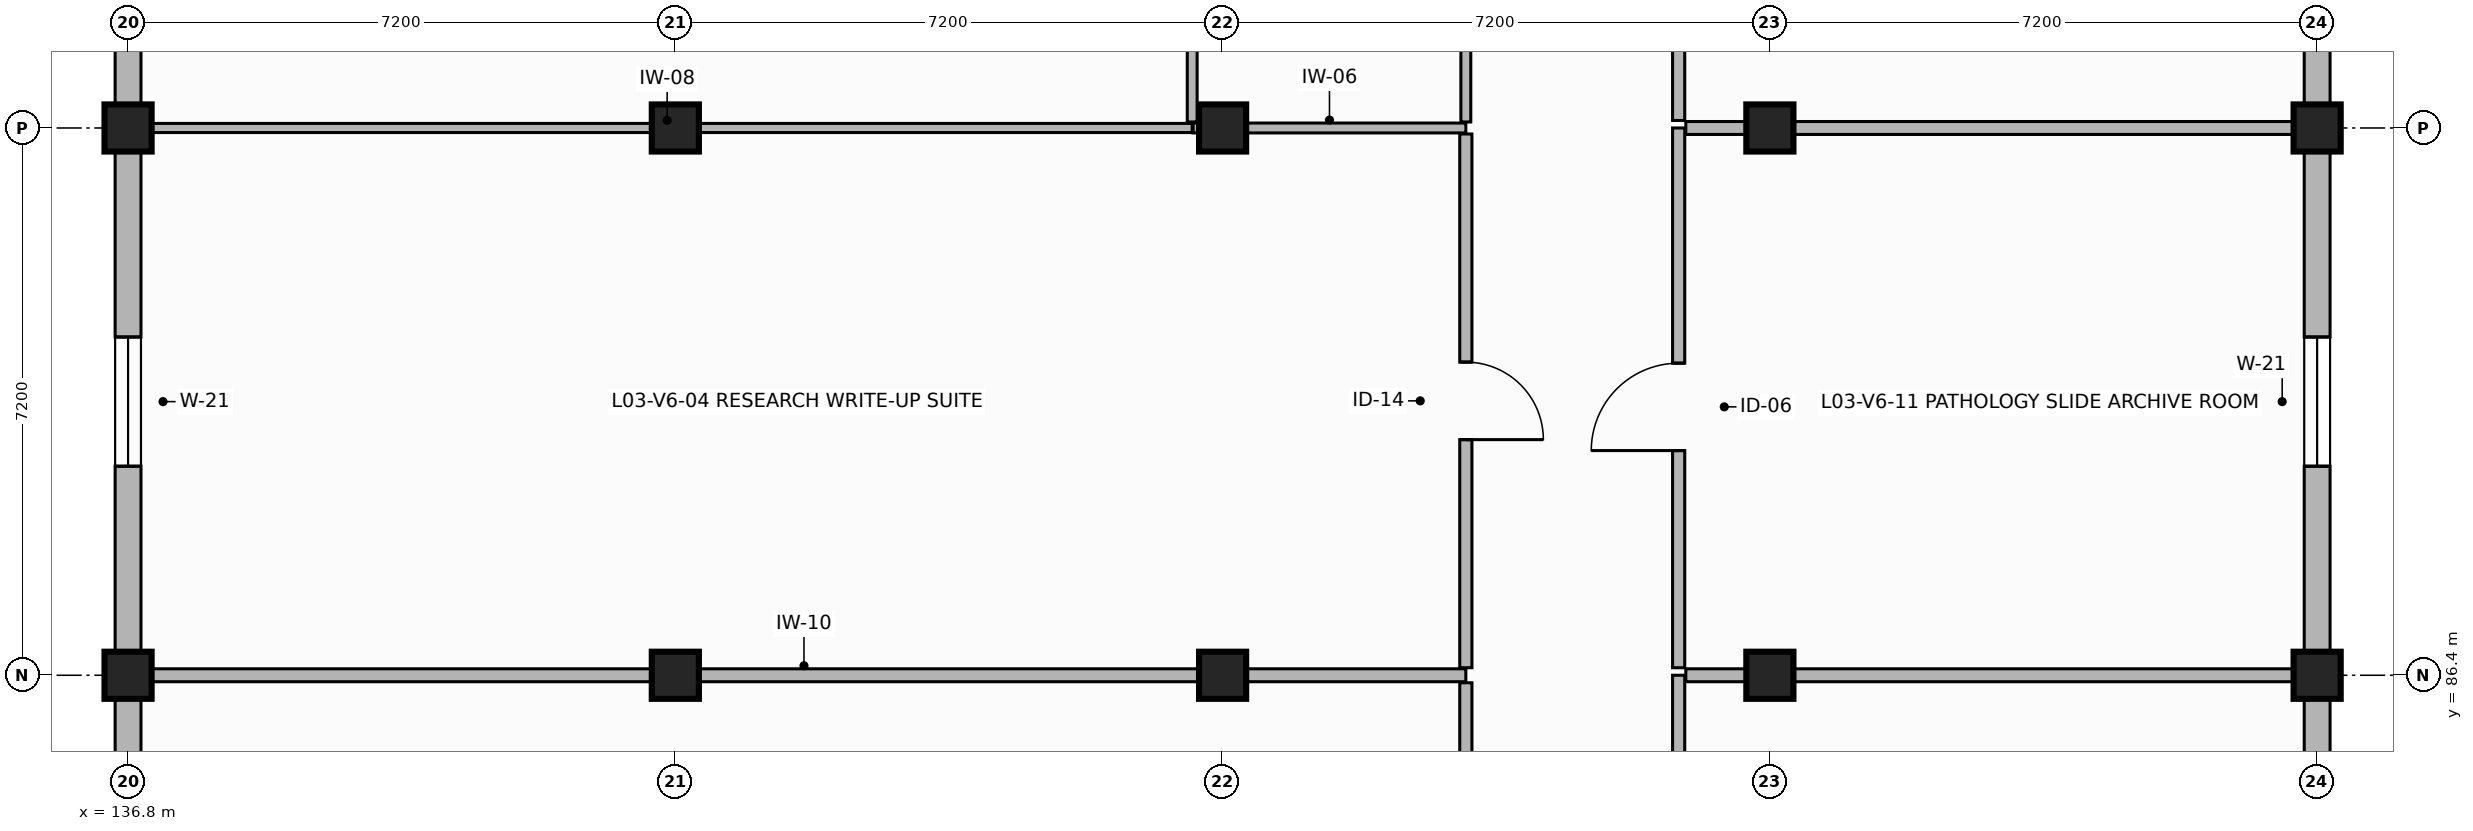
"""IFC4 building model, lengths in metres.
Left out: names, types, materials, properties, quantities, classifications, styles, units other than length and angle.
Written with IfcOpenShell. Run it as: python <this file> out.ifc"""

import sys

from ifc_helpers import new_model, si_unit, direction, frame, frame_2d, origin, origin_2d, place, context, subcontext, project, spatial, rectangle, extrude, element, fill, save


model = new_model("IFC4")
c1 = context("Model", 3, precision=1e-05, world=origin(), true_north=direction((0.0, 1.0)))
c2 = subcontext(c1, "Body", "Model", "MODEL_VIEW")
j1 = project(units=[si_unit("LENGTHUNIT", "METRE"), si_unit("PLANEANGLEUNIT", "RADIAN")], contexts=[c1])
p1 = place(None, origin())
s1 = spatial("IfcSite", under=j1, at=p1, CompositionType="ELEMENT")
p2 = place(p1, origin())
s2 = spatial("IfcBuilding", under=s1, at=p2, CompositionType="ELEMENT")
p3 = place(p2, frame((0.0, 0.0, 12.3)))
s3 = spatial("IfcBuildingStorey", under=s2, at=p3, CompositionType="ELEMENT", Elevation=12.3)
for number, where, z_axis, x_axis in (
    (1, (136.8, 86.4, 0.0), (0.0, 0.0, 1.0), (1.0, 0.0, 0.0)),
    (2, (136.8, 93.6, 0.0), (0.0, 0.0, 1.0), (1.0, 0.0, 0.0)),
    (3, (144.0, 86.4, 0.0), (0.0, 0.0, 1.0), (1.0, 0.0, 0.0)),
    (4, (144.0, 93.6, 0.0), (0.0, 0.0, 1.0), (1.0, 0.0, 0.0)),
    (5, (151.2, 86.4, 0.0), (0.0, 0.0, 1.0), (1.0, 0.0, 0.0)),
    (6, (151.2, 93.6, 0.0), (0.0, 0.0, 1.0), (1.0, 0.0, 0.0)),
    (7, (158.4, 86.4, 0.0), (0.0, 0.0, 1.0), (1.0, 0.0, 0.0)),
    (8, (158.4, 93.6, 0.0), (0.0, 0.0, 1.0), (1.0, 0.0, 0.0)),
    (9, (165.6, 86.4, 0.0), (0.0, 0.0, 1.0), (1.0, 0.0, 0.0)),
    (10, (165.6, 93.6, 0.0), (0.0, 0.0, 1.0), (1.0, 0.0, 0.0)),
):
    element("IfcColumn", number, at=place(p3, frame(where, z_axis=z_axis, x_axis=x_axis)), inside=s3, PredefinedType="COLUMN", context=c2, shape_type="SweptSolid", body=[
        extrude(rectangle(XDim=0.62, YDim=0.62, at=origin_2d()), origin(), (0.0, 0.0, 1.0), 3.38),
    ])
p4 = place(p3, frame((165.6, 79.2, 0.0), z_axis=(0.0, 0.0, 1.0), x_axis=(0.0, 1.0, 0.0)))
e11 = element("IfcWall", 11, at=p4, inside=s3, PredefinedType="SOLIDWALL", context=c2, shape_type="SweptSolid", body=[
    extrude(rectangle(XDim=7.2, YDim=0.34, at=frame_2d((3.6, 0.0))), origin(), (0.0, 0.0, 1.0), 2.71),
])
p5 = place(p4, frame((2.75, 0.0, 0.85)))
e12 = element("IfcOpeningElement", 12, at=p5, cuts=e11, PredefinedType="OPENING", context=c2, shape_type="SweptSolid", body=[
    extrude(rectangle(XDim=1.7, YDim=1.65, at=frame_2d((0.85, 0.825))), frame((0.0, 0.18, 0.0), z_axis=(0.0, -1.0, 0.0), x_axis=(1.0, 0.0, 0.0)), (0.0, 0.0, 1.0), 0.36),
])
p6 = place(p3, frame((165.6, 86.4, 0.0), z_axis=(0.0, 0.0, 1.0), x_axis=(0.0, 1.0, 0.0)))
e13 = element("IfcWall", 13, at=p6, inside=s3, PredefinedType="SOLIDWALL", context=c2, shape_type="SweptSolid", body=[
    extrude(rectangle(XDim=7.2, YDim=0.34, at=frame_2d((3.6, 0.0))), origin(), (0.0, 0.0, 1.0), 2.71),
])
p7 = place(p6, frame((2.75, 0.0, 0.85)))
e14 = element("IfcOpeningElement", 14, at=p7, cuts=e13, PredefinedType="OPENING", context=c2, shape_type="SweptSolid", body=[
    extrude(rectangle(XDim=1.7, YDim=1.65, at=frame_2d((0.85, 0.825))), frame((0.0, 0.18, 0.0), z_axis=(0.0, -1.0, 0.0), x_axis=(1.0, 0.0, 0.0)), (0.0, 0.0, 1.0), 0.36),
])
p8 = place(p3, frame((165.6, 93.6, 0.0), z_axis=(0.0, 0.0, 1.0), x_axis=(0.0, 1.0, 0.0)))
e15 = element("IfcWall", 15, at=p8, inside=s3, PredefinedType="SOLIDWALL", context=c2, shape_type="SweptSolid", body=[
    extrude(rectangle(XDim=7.2, YDim=0.34, at=frame_2d((3.6, 0.0))), origin(), (0.0, 0.0, 1.0), 2.71),
])
p9 = place(p8, frame((2.75, 0.0, 0.85)))
e16 = element("IfcOpeningElement", 16, at=p9, cuts=e15, PredefinedType="OPENING", context=c2, shape_type="SweptSolid", body=[
    extrude(rectangle(XDim=1.7, YDim=1.65, at=frame_2d((0.85, 0.825))), frame((0.0, 0.18, 0.0), z_axis=(0.0, -1.0, 0.0), x_axis=(1.0, 0.0, 0.0)), (0.0, 0.0, 1.0), 0.36),
])
p10 = place(p3, frame((136.8, 100.8, 0.0), z_axis=(0.0, 0.0, 1.0), x_axis=(0.0, -1.0, 0.0)))
e17 = element("IfcWall", 17, at=p10, inside=s3, PredefinedType="SOLIDWALL", context=c2, shape_type="SweptSolid", body=[
    extrude(rectangle(XDim=7.2, YDim=0.34, at=frame_2d((3.6, 0.0))), origin(), (0.0, 0.0, 1.0), 2.71),
])
p11 = place(p10, frame((2.75, 0.0, 0.85)))
e18 = element("IfcOpeningElement", 18, at=p11, cuts=e17, PredefinedType="OPENING", context=c2, shape_type="SweptSolid", body=[
    extrude(rectangle(XDim=1.7, YDim=1.65, at=frame_2d((0.85, 0.825))), frame((0.0, 0.18, 0.0), z_axis=(0.0, -1.0, 0.0), x_axis=(1.0, 0.0, 0.0)), (0.0, 0.0, 1.0), 0.36),
])
p12 = place(p3, frame((136.8, 93.6, 0.0), z_axis=(0.0, 0.0, 1.0), x_axis=(0.0, -1.0, 0.0)))
e19 = element("IfcWall", 19, at=p12, inside=s3, PredefinedType="SOLIDWALL", context=c2, shape_type="SweptSolid", body=[
    extrude(rectangle(XDim=7.2, YDim=0.34, at=frame_2d((3.6, 0.0))), origin(), (0.0, 0.0, 1.0), 2.71),
])
p13 = place(p12, frame((2.75, 0.0, 0.85)))
e20 = element("IfcOpeningElement", 20, at=p13, cuts=e19, PredefinedType="OPENING", context=c2, shape_type="SweptSolid", body=[
    extrude(rectangle(XDim=1.7, YDim=1.65, at=frame_2d((0.85, 0.825))), frame((0.0, 0.18, 0.0), z_axis=(0.0, -1.0, 0.0), x_axis=(1.0, 0.0, 0.0)), (0.0, 0.0, 1.0), 0.36),
])
p14 = place(p3, frame((136.8, 86.4, 0.0), z_axis=(0.0, 0.0, 1.0), x_axis=(0.0, -1.0, 0.0)))
e21 = element("IfcWall", 21, at=p14, inside=s3, PredefinedType="SOLIDWALL", context=c2, shape_type="SweptSolid", body=[
    extrude(rectangle(XDim=7.2, YDim=0.34, at=frame_2d((3.6, 0.0))), origin(), (0.0, 0.0, 1.0), 2.71),
])
p15 = place(p14, frame((2.75, 0.0, 0.85)))
e22 = element("IfcOpeningElement", 22, at=p15, cuts=e21, PredefinedType="OPENING", context=c2, shape_type="SweptSolid", body=[
    extrude(rectangle(XDim=1.7, YDim=1.65, at=frame_2d((0.85, 0.825))), frame((0.0, 0.18, 0.0), z_axis=(0.0, -1.0, 0.0), x_axis=(1.0, 0.0, 0.0)), (0.0, 0.0, 1.0), 0.36),
])
p16 = place(p3, frame((136.985, 86.4, 0.0), z_axis=(0.0, 0.0, 1.0), x_axis=(1.0, 0.0, 0.0)))
e23 = element("IfcWall", 23, at=p16, inside=s3, PredefinedType="PARTITIONING", context=c2, shape_type="SweptSolid", body=[
    extrude(rectangle(XDim=17.415, YDim=0.17, at=frame_2d((8.708, 0.0))), origin(), (0.0, 0.0, 1.0), 2.69),
])
p17 = place(p3, frame((154.4, 86.301, 0.0), z_axis=(0.0, 0.0, 1.0), x_axis=(0.0, -1.0, 0.0)))
e24 = element("IfcWall", 24, at=p17, inside=s3, PredefinedType="PARTITIONING", context=c2, shape_type="SweptSolid", body=[
    extrude(rectangle(XDim=7.556, YDim=0.16, at=frame_2d((3.778, 0.0))), origin(), (0.0, 0.0, 1.0), 2.69),
])
p18 = place(p17, frame((2.848, 0.0, 0.0)))
e25 = element("IfcOpeningElement", 25, at=p18, cuts=e24, PredefinedType="OPENING", context=c2, shape_type="SweptSolid", body=[
    extrude(rectangle(XDim=1.15, YDim=2.25, at=frame_2d((0.575, 1.125))), frame((0.0, 0.09, 0.0), z_axis=(0.0, -1.0, 0.0), x_axis=(1.0, 0.0, 0.0)), (0.0, 0.0, 1.0), 0.18),
])
p19 = place(p3, frame((136.985, 93.6, 0.0), z_axis=(0.0, 0.0, 1.0), x_axis=(1.0, 0.0, 0.0)))
e26 = element("IfcWall", 26, at=p19, inside=s3, PredefinedType="PARTITIONING", context=c2, shape_type="SweptSolid", body=[
    extrude(rectangle(XDim=13.815, YDim=0.12, at=frame_2d((6.907, 0.0))), origin(), (0.0, 0.0, 1.0), 2.69),
])
p20 = place(p3, frame((150.812, 93.6, 0.0), z_axis=(0.0, 0.0, 1.0), x_axis=(1.0, 0.0, 0.0)))
e27 = element("IfcWall", 27, at=p20, inside=s3, PredefinedType="PARTITIONING", context=c2, shape_type="SweptSolid", body=[
    extrude(rectangle(XDim=3.588, YDim=0.13, at=frame_2d((1.794, 0.0))), origin(), (0.0, 0.0, 1.0), 2.69),
])
p21 = place(p3, frame((154.4, 93.521, 0.0), z_axis=(0.0, 0.0, 1.0), x_axis=(0.0, -1.0, 0.0)))
e28 = element("IfcWall", 28, at=p21, inside=s3, PredefinedType="PARTITIONING", context=c2, shape_type="SweptSolid", body=[
    extrude(rectangle(XDim=7.022, YDim=0.16, at=frame_2d((3.511, 0.0))), origin(), (0.0, 0.0, 1.0), 2.69),
])
p22 = place(p21, frame((3.001, 0.0, 0.0)))
e29 = element("IfcOpeningElement", 29, at=p22, cuts=e28, PredefinedType="OPENING", context=c2, shape_type="SweptSolid", body=[
    extrude(rectangle(XDim=1.02, YDim=2.15, at=frame_2d((0.51, 1.075))), frame((0.0, 0.09, 0.0), z_axis=(0.0, -1.0, 0.0), x_axis=(1.0, 0.0, 0.0)), (0.0, 0.0, 1.0), 0.18),
])
p23 = place(p3, frame((150.8, 93.679, 0.0), z_axis=(0.0, 0.0, 1.0), x_axis=(0.0, 1.0, 0.0)))
e30 = element("IfcWall", 30, at=p23, inside=s3, PredefinedType="PARTITIONING", context=c2, shape_type="SweptSolid", body=[
    extrude(rectangle(XDim=4.521, YDim=0.13, at=frame_2d((2.26, 0.0))), origin(), (0.0, 0.0, 1.0), 2.69),
])
p24 = place(p3, frame((154.4, 98.121, 0.0), z_axis=(0.0, 0.0, 1.0), x_axis=(0.0, -1.0, 0.0)))
e31 = element("IfcWall", 31, at=p24, inside=s3, PredefinedType="PARTITIONING", context=c2, shape_type="SweptSolid", body=[
    extrude(rectangle(XDim=4.442, YDim=0.13, at=frame_2d((2.221, 0.0))), origin(), (0.0, 0.0, 1.0), 2.69),
])
p25 = place(p24, frame((0.48, 0.0, 0.0)))
e32 = element("IfcOpeningElement", 32, at=p25, cuts=e31, PredefinedType="OPENING", context=c2, shape_type="SweptSolid", body=[
    extrude(rectangle(XDim=0.95, YDim=2.1, at=frame_2d((0.475, 1.05))), frame((0.0, 0.075, 0.0), z_axis=(0.0, -1.0, 0.0), x_axis=(1.0, 0.0, 0.0)), (0.0, 0.0, 1.0), 0.15),
])
p26 = place(p3, frame((157.2, 72.099, 0.0), z_axis=(0.0, 0.0, 1.0), x_axis=(0.0, 1.0, 0.0)))
e33 = element("IfcWall", 33, at=p26, inside=s3, PredefinedType="PARTITIONING", context=c2, shape_type="SweptSolid", body=[
    extrude(rectangle(XDim=14.301, YDim=0.16, at=frame_2d((7.15, 0.0))), origin(), (0.0, 0.0, 1.0), 2.69),
])
p27 = place(p26, frame((10.175, 0.0, 0.0)))
e34 = element("IfcOpeningElement", 34, at=p27, cuts=e33, PredefinedType="OPENING", context=c2, shape_type="SweptSolid", body=[
    extrude(rectangle(XDim=0.98, YDim=2.15, at=frame_2d((0.49, 1.075))), frame((0.0, 0.09, 0.0), z_axis=(0.0, -1.0, 0.0), x_axis=(1.0, 0.0, 0.0)), (0.0, 0.0, 1.0), 0.18),
])
p28 = place(p3, frame((157.294, 86.4, 0.0), z_axis=(0.0, 0.0, 1.0), x_axis=(1.0, 0.0, 0.0)))
e35 = element("IfcWall", 35, at=p28, inside=s3, PredefinedType="PARTITIONING", context=c2, shape_type="SweptSolid", body=[
    extrude(rectangle(XDim=8.121, YDim=0.17, at=frame_2d((4.061, 0.0))), origin(), (0.0, 0.0, 1.0), 2.69),
])
p29 = place(p3, frame((157.2, 86.499, 0.0), z_axis=(0.0, 0.0, 1.0), x_axis=(0.0, 1.0, 0.0)))
e36 = element("IfcWall", 36, at=p29, inside=s3, PredefinedType="PARTITIONING", context=c2, shape_type="SweptSolid", body=[
    extrude(rectangle(XDim=7.101, YDim=0.16, at=frame_2d((3.551, 0.0))), origin(), (0.0, 0.0, 1.0), 2.69),
])
p30 = place(p29, frame((2.857, 0.0, 0.0)))
e37 = element("IfcOpeningElement", 37, at=p30, cuts=e36, PredefinedType="OPENING", context=c2, shape_type="SweptSolid", body=[
    extrude(rectangle(XDim=1.15, YDim=2.25, at=frame_2d((0.575, 1.125))), frame((0.0, 0.09, 0.0), z_axis=(0.0, -1.0, 0.0), x_axis=(1.0, 0.0, 0.0)), (0.0, 0.0, 1.0), 0.18),
])
p31 = place(p3, frame((157.294, 93.6, 0.0), z_axis=(0.0, 0.0, 1.0), x_axis=(1.0, 0.0, 0.0)))
e38 = element("IfcWall", 38, at=p31, inside=s3, PredefinedType="PARTITIONING", context=c2, shape_type="SweptSolid", body=[
    extrude(rectangle(XDim=8.121, YDim=0.17, at=frame_2d((4.061, 0.0))), origin(), (0.0, 0.0, 1.0), 2.69),
])
p32 = place(p3, frame((157.2, 93.699, 0.0), z_axis=(0.0, 0.0, 1.0), x_axis=(0.0, 1.0, 0.0)))
e39 = element("IfcWall", 39, at=p32, inside=s3, PredefinedType="PARTITIONING", context=c2, shape_type="SweptSolid", body=[
    extrude(rectangle(XDim=7.101, YDim=0.16, at=frame_2d((3.551, 0.0))), origin(), (0.0, 0.0, 1.0), 2.69),
])
p33 = place(p32, frame((2.857, 0.0, 0.0)))
e40 = element("IfcOpeningElement", 40, at=p33, cuts=e39, PredefinedType="OPENING", context=c2, shape_type="SweptSolid", body=[
    extrude(rectangle(XDim=1.15, YDim=2.25, at=frame_2d((0.575, 1.125))), frame((0.0, 0.09, 0.0), z_axis=(0.0, -1.0, 0.0), x_axis=(1.0, 0.0, 0.0)), (0.0, 0.0, 1.0), 0.18),
])
p34 = place(p7, origin())
e41 = element("IfcWindow", 41, at=p34, inside=s3, PartitioningType="SINGLE_PANEL", PredefinedType="WINDOW", context=c2, shape_type="SweptSolid", body=[
    extrude(rectangle(XDim=1.7, YDim=1.65, at=frame_2d((0.85, 0.825))), frame((0.0, 0.03, 0.0), z_axis=(0.0, -1.0, 0.0), x_axis=(1.0, 0.0, 0.0)), (0.0, 0.0, 1.0), 0.06),
])
fill(e14, e41)
p35 = place(p13, origin())
e42 = element("IfcWindow", 42, at=p35, inside=s3, PartitioningType="SINGLE_PANEL", PredefinedType="WINDOW", context=c2, shape_type="SweptSolid", body=[
    extrude(rectangle(XDim=1.7, YDim=1.65, at=frame_2d((0.85, 0.825))), frame((0.0, 0.03, 0.0), z_axis=(0.0, -1.0, 0.0), x_axis=(1.0, 0.0, 0.0)), (0.0, 0.0, 1.0), 0.06),
])
fill(e20, e42)
p36 = place(p22, origin())
e43 = element("IfcDoor", 43, at=p36, inside=s3, OperationType="SINGLE_SWING_RIGHT", PredefinedType="DOOR", context=c2, shape_type="SweptSolid", body=[
    extrude(rectangle(XDim=1.02, YDim=2.15, at=frame_2d((0.51, 1.075))), frame((0.0, 0.025, 0.0), z_axis=(0.0, -1.0, 0.0), x_axis=(1.0, 0.0, 0.0)), (0.0, 0.0, 1.0), 0.05),
])
fill(e29, e43)
p37 = place(p30, origin())
e44 = element("IfcDoor", 44, at=p37, inside=s3, OperationType="SINGLE_SWING_LEFT", PredefinedType="DOOR", context=c2, shape_type="SweptSolid", body=[
    extrude(rectangle(XDim=1.15, YDim=2.25, at=frame_2d((0.575, 1.125))), frame((0.0, 0.025, 0.0), z_axis=(0.0, -1.0, 0.0), x_axis=(1.0, 0.0, 0.0)), (0.0, 0.0, 1.0), 0.05),
])
fill(e37, e44)
save(model, sys.argv[1])
